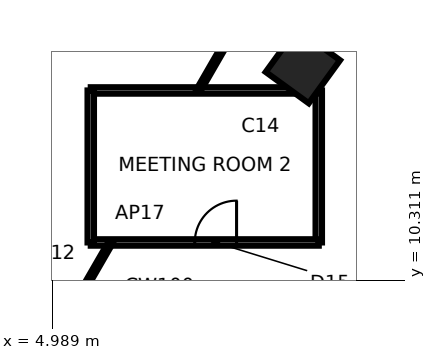
"""IFC4 building model, lengths in metres.
Left out: names, types, materials, properties, quantities, classifications, styles, units other than length and angle.
Written with IfcOpenShell. Run it as: python <this file> out.ifc"""

import sys

from ifc_helpers import new_model, si_unit, direction, frame, frame_2d, origin, origin_2d, place, context, subcontext, project, spatial, rectangle, extrude, element, fill, save


model = new_model("IFC4")
c1 = context("Model", 3, precision=1e-05, world=origin(), true_north=direction((0.0, 1.0)))
c2 = subcontext(c1, "Body", "Model", "MODEL_VIEW")
j1 = project(units=[si_unit("LENGTHUNIT", "METRE"), si_unit("PLANEANGLEUNIT", "RADIAN")], contexts=[c1])
p1 = place(None, origin())
s1 = spatial("IfcSite", under=j1, at=p1, CompositionType="ELEMENT")
p2 = place(p1, origin())
s2 = spatial("IfcBuilding", under=s1, at=p2, CompositionType="ELEMENT")
p3 = place(p2, frame((0.0, 0.0, 242.3)))
s3 = spatial("IfcBuildingStorey", under=s2, at=p3, CompositionType="ELEMENT", Elevation=242.3)
p4 = place(p3, frame((11.581, 15.94, 0.0), z_axis=(0.0, 0.0, 1.0), x_axis=(0.587785252292, 0.809016994375, 0.0)))
e1 = element("IfcColumn", 1, at=p4, inside=s3, PredefinedType="COLUMN", context=c2, shape_type="SweptSolid", body=[
    extrude(rectangle(XDim=1.4, YDim=1.4, at=origin_2d()), origin(), (0.0, 0.0, 1.0), 3.9),
])
p5 = place(p3, frame((12.0, 11.3, 0.0), z_axis=(0.0, 0.0, 1.0), x_axis=(0.0, 1.0, 0.0)))
e2 = element("IfcWall", 2, at=p5, inside=s3, PredefinedType="PARTITIONING", context=c2, shape_type="SweptSolid", body=[
    extrude(rectangle(XDim=4.0, YDim=0.17, at=frame_2d((2.0, 0.0))), origin(), (0.0, 0.0, 1.0), 3.7),
])
p6 = place(p3, frame((6.0, 11.3, 0.0), z_axis=(0.0, 0.0, 1.0), x_axis=(1.0, 0.0, 0.0)))
e3 = element("IfcWall", 3, at=p6, inside=s3, PredefinedType="PARTITIONING", context=c2, shape_type="SweptSolid", body=[
    extrude(rectangle(XDim=6.0, YDim=0.17, at=frame_2d((3.0, 0.0))), origin(), (0.0, 0.0, 1.0), 3.7),
])
p7 = place(p6, frame((2.737, 0.0, 0.0)))
e4 = element("IfcOpeningElement", 4, at=p7, cuts=e3, PredefinedType="OPENING", context=c2, shape_type="SweptSolid", body=[
    extrude(rectangle(XDim=1.1, YDim=2.4, at=frame_2d((0.55, 1.2))), frame((0.0, 0.095, 0.0), z_axis=(0.0, -1.0, 0.0), x_axis=(1.0, 0.0, 0.0)), (0.0, 0.0, 1.0), 0.19),
])
p8 = place(p3, frame((12.0, 15.3, 0.0), z_axis=(0.0, 0.0, 1.0), x_axis=(-1.0, 0.0, 0.0)))
e5 = element("IfcWall", 5, at=p8, inside=s3, PredefinedType="PARTITIONING", context=c2, shape_type="SweptSolid", body=[
    extrude(rectangle(XDim=6.0, YDim=0.17, at=frame_2d((3.0, 0.0))), origin(), (0.0, 0.0, 1.0), 3.7),
])
p9 = place(p3, frame((8.833, 15.3, 0.0), z_axis=(0.0, 0.0, 1.0), x_axis=(0.499983401189, 0.8660349869, 0.0)))
e6 = element("IfcWall", 6, at=p9, inside=s3, PredefinedType="PARTITIONING", context=c2, shape_type="SweptSolid", body=[
    extrude(rectangle(XDim=3.401, YDim=0.12, at=frame_2d((1.701, 0.0))), origin(), (0.0, 0.0, 1.0), 3.7),
])
p10 = place(p3, frame((5.485, 9.5, 0.0), z_axis=(0.0, 0.0, 1.0), x_axis=(0.499929208183, 0.866066271601, 0.0)))
e7 = element("IfcWall", 7, at=p10, inside=s3, PredefinedType="PARTITIONING", context=c2, shape_type="SweptSolid", body=[
    extrude(rectangle(XDim=2.078, YDim=0.12, at=frame_2d((1.039, 0.0))), origin(), (0.0, 0.0, 1.0), 3.7),
])
p11 = place(p3, frame((6.0, 15.3, 0.0), z_axis=(0.0, 0.0, 1.0), x_axis=(0.0, -1.0, 0.0)))
e8 = element("IfcWall", 8, at=p11, inside=s3, PredefinedType="PARTITIONING", context=c2, shape_type="SweptSolid", body=[
    extrude(rectangle(XDim=4.0, YDim=0.17, at=frame_2d((2.0, 0.0))), origin(), (0.0, 0.0, 1.0), 3.7),
])
p12 = place(p7, origin())
e9 = element("IfcDoor", 9, at=p12, inside=s3, OperationType="SINGLE_SWING_RIGHT", PredefinedType="DOOR", context=c2, shape_type="SweptSolid", body=[
    extrude(rectangle(XDim=1.1, YDim=2.4, at=frame_2d((0.55, 1.2))), frame((0.0, 0.025, 0.0), z_axis=(0.0, -1.0, 0.0), x_axis=(1.0, 0.0, 0.0)), (0.0, 0.0, 1.0), 0.05),
])
fill(e4, e9)
save(model, sys.argv[1])
